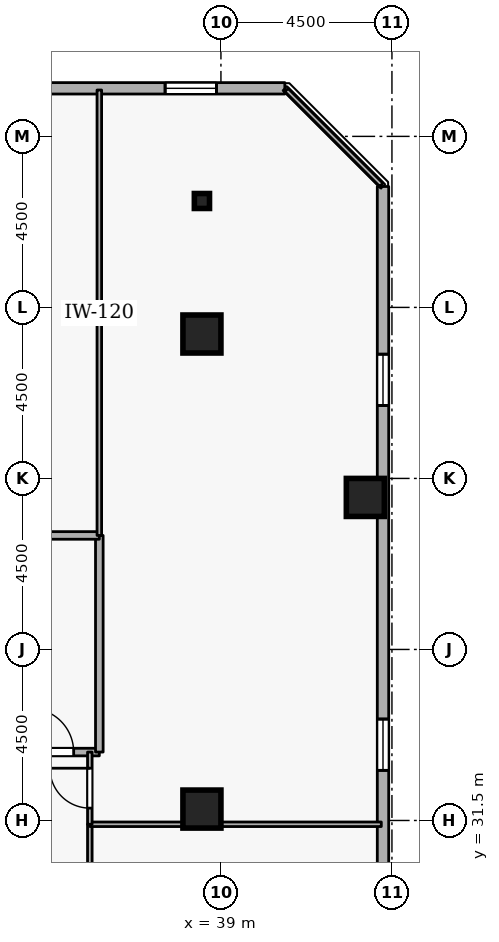
"""IFC4 building model, lengths in metres.
Left out: names, types, materials, properties, quantities, classifications, styles, units other than length and angle.
Written with IfcOpenShell. Run it as: python <this file> out.ifc"""

import sys

from ifc_helpers import new_model, si_unit, direction, frame, frame_2d, origin, origin_2d, place, context, subcontext, project, spatial, rectangle, i_section, extrude, element, fill, save


model = new_model("IFC4")
c1 = context("Model", 3, precision=1e-05, world=origin(), true_north=direction((0.0, 1.0)))
c2 = subcontext(c1, "Body", "Model", "MODEL_VIEW")
j1 = project(units=[si_unit("LENGTHUNIT", "METRE"), si_unit("PLANEANGLEUNIT", "RADIAN")], contexts=[c1])
p1 = place(None, origin())
s1 = spatial("IfcSite", under=j1, at=p1, CompositionType="ELEMENT")
p2 = place(p1, origin())
s2 = spatial("IfcBuilding", under=s1, at=p2, CompositionType="ELEMENT")
p3 = place(p2, frame((0.0, 0.0, 225.9)))
s3 = spatial("IfcBuildingStorey", under=s2, at=p3, CompositionType="ELEMENT", Elevation=225.9)
for number, where, z_axis, x_axis in (
    (1, (42.8, 40.0, 0.0), (0.0, 0.0, 1.0), (1.0, 0.0, 0.0)),
    (2, (38.5, 44.3, 0.0), (0.0, 0.0, 1.0), (1.0, 0.0, 0.0)),
    (3, (38.5, 31.8, 0.0), (0.0, 0.0, 1.0), (1.0, 0.0, 0.0)),
):
    element("IfcColumn", number, at=place(p3, frame(where, z_axis=z_axis, x_axis=x_axis)), inside=s3, PredefinedType="COLUMN", context=c2, shape_type="SweptSolid", body=[
        extrude(rectangle(XDim=1.0, YDim=1.0, at=origin_2d()), origin(), (0.0, 0.0, 1.0), 3.6),
    ])
p4 = place(p3, frame((38.5, 47.8, 0.0), z_axis=(0.0, 0.0, 1.0), x_axis=(1.0, 0.0, 0.0)))
e4 = element("IfcColumn", 4, at=p4, inside=s3, PredefinedType="COLUMN", context=c2, shape_type="SweptSolid", body=[
    extrude(i_section(OverallWidth=0.399, OverallDepth=0.394, WebThickness=0.023, FlangeThickness=0.037, FilletRadius=0.015, at=origin_2d()), origin(), (0.0, 0.0, 1.0), 3.6),
])
p5 = place(p3, frame((43.265, 11.819, 0.0), z_axis=(0.0, 0.0, 1.0), x_axis=(0.0, 1.0, 0.0)))
e5 = element("IfcWall", 5, at=p5, inside=s3, PredefinedType="STANDARD", context=c2, shape_type="SweptSolid", body=[
    extrude(rectangle(XDim=36.363, YDim=0.3, at=frame_2d((18.181, 0.0))), origin(), (0.0, 0.0, 1.0), 2.22),
])
p6 = place(p5, frame((6.6, 0.0, 0.72)))
e6 = element("IfcOpeningElement", 6, at=p6, cuts=e5, PredefinedType="OPENING", context=c2, shape_type="SweptSolid", body=[
    extrude(rectangle(XDim=1.35, YDim=1.05, at=frame_2d((0.675, 0.525))), frame((0.0, 0.16, 0.0), z_axis=(0.0, -1.0, 0.0), x_axis=(1.0, 0.0, 0.0)), (0.0, 0.0, 1.0), 0.32),
])
p7 = place(p5, frame((11.4, 0.0, 0.72)))
e7 = element("IfcOpeningElement", 7, at=p7, cuts=e5, PredefinedType="OPENING", context=c2, shape_type="SweptSolid", body=[
    extrude(rectangle(XDim=1.35, YDim=1.05, at=frame_2d((0.675, 0.525))), frame((0.0, 0.16, 0.0), z_axis=(0.0, -1.0, 0.0), x_axis=(1.0, 0.0, 0.0)), (0.0, 0.0, 1.0), 0.32),
])
p8 = place(p5, frame((21.0, 0.0, 0.72)))
e8 = element("IfcOpeningElement", 8, at=p8, cuts=e5, PredefinedType="OPENING", context=c2, shape_type="SweptSolid", body=[
    extrude(rectangle(XDim=1.35, YDim=1.05, at=frame_2d((0.675, 0.525))), frame((0.0, 0.16, 0.0), z_axis=(0.0, -1.0, 0.0), x_axis=(1.0, 0.0, 0.0)), (0.0, 0.0, 1.0), 0.32),
])
p9 = place(p5, frame((30.6, 0.0, 0.72)))
e9 = element("IfcOpeningElement", 9, at=p9, cuts=e5, PredefinedType="OPENING", context=c2, shape_type="SweptSolid", body=[
    extrude(rectangle(XDim=1.35, YDim=1.05, at=frame_2d((0.675, 0.525))), frame((0.0, 0.16, 0.0), z_axis=(0.0, -1.0, 0.0), x_axis=(1.0, 0.0, 0.0)), (0.0, 0.0, 1.0), 0.32),
])
p10 = place(p3, frame((40.681, 50.765, 0.0), z_axis=(0.0, 0.0, 1.0), x_axis=(-1.0, 0.0, 0.0)))
e10 = element("IfcWall", 10, at=p10, inside=s3, PredefinedType="STANDARD", context=c2, shape_type="SweptSolid", body=[
    extrude(rectangle(XDim=36.363, YDim=0.3, at=frame_2d((18.181, 0.0))), origin(), (0.0, 0.0, 1.0), 2.22),
])
p11 = place(p10, frame((1.8, 0.0, 0.72)))
e11 = element("IfcOpeningElement", 11, at=p11, cuts=e10, PredefinedType="OPENING", context=c2, shape_type="SweptSolid", body=[
    extrude(rectangle(XDim=1.35, YDim=1.05, at=frame_2d((0.675, 0.525))), frame((0.0, 0.16, 0.0), z_axis=(0.0, -1.0, 0.0), x_axis=(1.0, 0.0, 0.0)), (0.0, 0.0, 1.0), 0.32),
])
p12 = place(p10, frame((6.6, 0.0, 0.72)))
e12 = element("IfcOpeningElement", 12, at=p12, cuts=e10, PredefinedType="OPENING", context=c2, shape_type="SweptSolid", body=[
    extrude(rectangle(XDim=1.35, YDim=1.05, at=frame_2d((0.675, 0.525))), frame((0.0, 0.16, 0.0), z_axis=(0.0, -1.0, 0.0), x_axis=(1.0, 0.0, 0.0)), (0.0, 0.0, 1.0), 0.32),
])
p13 = place(p10, frame((11.4, 0.0, 0.72)))
e13 = element("IfcOpeningElement", 13, at=p13, cuts=e10, PredefinedType="OPENING", context=c2, shape_type="SweptSolid", body=[
    extrude(rectangle(XDim=1.35, YDim=1.05, at=frame_2d((0.675, 0.525))), frame((0.0, 0.16, 0.0), z_axis=(0.0, -1.0, 0.0), x_axis=(1.0, 0.0, 0.0)), (0.0, 0.0, 1.0), 0.32),
])
p14 = place(p10, frame((16.2, 0.0, 0.72)))
e14 = element("IfcOpeningElement", 14, at=p14, cuts=e10, PredefinedType="OPENING", context=c2, shape_type="SweptSolid", body=[
    extrude(rectangle(XDim=1.35, YDim=1.05, at=frame_2d((0.675, 0.525))), frame((0.0, 0.16, 0.0), z_axis=(0.0, -1.0, 0.0), x_axis=(1.0, 0.0, 0.0)), (0.0, 0.0, 1.0), 0.32),
])
p15 = place(p10, frame((21.0, 0.0, 0.72)))
e15 = element("IfcOpeningElement", 15, at=p15, cuts=e10, PredefinedType="OPENING", context=c2, shape_type="SweptSolid", body=[
    extrude(rectangle(XDim=1.35, YDim=1.05, at=frame_2d((0.675, 0.525))), frame((0.0, 0.16, 0.0), z_axis=(0.0, -1.0, 0.0), x_axis=(1.0, 0.0, 0.0)), (0.0, 0.0, 1.0), 0.32),
])
p16 = place(p10, frame((30.6, 0.0, 0.72)))
e16 = element("IfcOpeningElement", 16, at=p16, cuts=e10, PredefinedType="OPENING", context=c2, shape_type="SweptSolid", body=[
    extrude(rectangle(XDim=1.35, YDim=1.05, at=frame_2d((0.675, 0.525))), frame((0.0, 0.16, 0.0), z_axis=(0.0, -1.0, 0.0), x_axis=(1.0, 0.0, 0.0)), (0.0, 0.0, 1.0), 0.32),
])
p17 = place(p3, frame((33.3, 33.3, 0.0), z_axis=(0.0, 0.0, 1.0), x_axis=(1.0, 0.0, 0.0)))
e17 = element("IfcWall", 17, at=p17, inside=s3, PredefinedType="STANDARD", context=c2, shape_type="SweptSolid", body=[
    extrude(rectangle(XDim=2.5, YDim=0.2, at=frame_2d((1.25, 0.0))), origin(), (0.0, 0.0, 1.0), 3.3),
])
p18 = place(p17, frame((0.675, 0.0, 0.0)))
e18 = element("IfcOpeningElement", 18, at=p18, cuts=e17, PredefinedType="OPENING", context=c2, shape_type="SweptSolid", body=[
    extrude(rectangle(XDim=1.15, YDim=2.1, at=frame_2d((0.575, 1.05))), frame((0.0, 0.11, 0.0), z_axis=(0.0, -1.0, 0.0), x_axis=(1.0, 0.0, 0.0)), (0.0, 0.0, 1.0), 0.22),
])
p19 = place(p3, frame((35.8, 33.3, 0.0), z_axis=(0.0, 0.0, 1.0), x_axis=(0.0, 1.0, 0.0)))
e19 = element("IfcWall", 19, at=p19, inside=s3, PredefinedType="STANDARD", context=c2, shape_type="SweptSolid", body=[
    extrude(rectangle(XDim=5.7, YDim=0.2, at=frame_2d((2.85, 0.0))), origin(), (0.0, 0.0, 1.0), 3.3),
])
p20 = place(p3, frame((35.8, 39.0, 0.0), z_axis=(0.0, 0.0, 1.0), x_axis=(-1.0, 0.0, 0.0)))
e20 = element("IfcWall", 20, at=p20, inside=s3, PredefinedType="STANDARD", context=c2, shape_type="SweptSolid", body=[
    extrude(rectangle(XDim=2.5, YDim=0.2, at=frame_2d((1.25, 0.0))), origin(), (0.0, 0.0, 1.0), 3.3),
])
p21 = place(p3, frame((35.55, 26.6, 0.0), z_axis=(0.0, 0.0, 1.0), x_axis=(0.0, 1.0, 0.0)))
e21 = element("IfcWall", 21, at=p21, inside=s3, PredefinedType="PARTITIONING", context=c2, shape_type="SweptSolid", body=[
    extrude(rectangle(XDim=4.8, YDim=0.12, at=frame_2d((2.4, 0.0))), origin(), (0.0, 0.0, 1.0), 3.3),
])
p22 = place(p21, frame((1.925, 0.0, 0.0)))
e22 = element("IfcOpeningElement", 22, at=p22, cuts=e21, PredefinedType="OPENING", context=c2, shape_type="SweptSolid", body=[
    extrude(rectangle(XDim=0.95, YDim=2.1, at=frame_2d((0.475, 1.05))), frame((0.0, 0.07, 0.0), z_axis=(0.0, -1.0, 0.0), x_axis=(1.0, 0.0, 0.0)), (0.0, 0.0, 1.0), 0.14),
])
p23 = place(p3, frame((35.55, 31.4, 0.0), z_axis=(0.0, 0.0, 1.0), x_axis=(1.0, 0.0, 0.0)))
e23 = element("IfcWall", 23, at=p23, inside=s3, PredefinedType="PARTITIONING", context=c2, shape_type="SweptSolid", body=[
    extrude(rectangle(XDim=7.67, YDim=0.12, at=frame_2d((3.835, 0.0))), origin(), (0.0, 0.0, 1.0), 3.3),
])
p24 = place(p3, frame((35.8, 39.0, 0.0), z_axis=(0.0, 0.0, 1.0), x_axis=(0.0, 1.0, 0.0)))
e24 = element("IfcWall", 24, at=p24, inside=s3, PredefinedType="PARTITIONING", context=c2, shape_type="SweptSolid", body=[
    extrude(rectangle(XDim=11.72, YDim=0.12, at=frame_2d((5.86, 0.0))), origin(), (0.0, 0.0, 1.0), 3.3),
])
p25 = place(p3, frame((40.725, 50.72, 0.0), z_axis=(0.0, 0.0, 1.0), x_axis=(0.707106781187, -0.707106781187, 0.0)))
e25 = element("IfcWall", 25, at=p25, inside=s3, PredefinedType="PARTITIONING", context=c2, shape_type="SweptSolid", body=[
    extrude(rectangle(XDim=3.528, YDim=0.12, at=frame_2d((1.764, 0.0))), origin(), (0.0, 0.0, 1.0), 3.3),
])
p26 = place(p3, frame((35.55, 31.4, 0.0), z_axis=(0.0, 0.0, 1.0), x_axis=(0.0, 1.0, 0.0)))
e26 = element("IfcWall", 26, at=p26, inside=s3, PredefinedType="PARTITIONING", context=c2, shape_type="SweptSolid", body=[
    extrude(rectangle(XDim=1.9, YDim=0.12, at=frame_2d((0.95, 0.0))), origin(), (0.0, 0.0, 1.0), 3.3),
])
p27 = place(p26, frame((0.425, 0.0, 0.0)))
e27 = element("IfcOpeningElement", 27, at=p27, cuts=e26, PredefinedType="OPENING", context=c2, shape_type="SweptSolid", body=[
    extrude(rectangle(XDim=1.05, YDim=2.1, at=frame_2d((0.525, 1.05))), frame((0.0, 0.07, 0.0), z_axis=(0.0, -1.0, 0.0), x_axis=(1.0, 0.0, 0.0)), (0.0, 0.0, 1.0), 0.14),
])
p28 = place(p8, origin())
e28 = element("IfcWindow", 28, at=p28, inside=s3, PartitioningType="SINGLE_PANEL", PredefinedType="WINDOW", context=c2, shape_type="SweptSolid", body=[
    extrude(rectangle(XDim=1.35, YDim=1.05, at=frame_2d((0.675, 0.525))), frame((0.0, 0.03, 0.0), z_axis=(0.0, -1.0, 0.0), x_axis=(1.0, 0.0, 0.0)), (0.0, 0.0, 1.0), 0.06),
])
fill(e8, e28)
p29 = place(p9, origin())
e29 = element("IfcWindow", 29, at=p29, inside=s3, PartitioningType="SINGLE_PANEL", PredefinedType="WINDOW", context=c2, shape_type="SweptSolid", body=[
    extrude(rectangle(XDim=1.35, YDim=1.05, at=frame_2d((0.675, 0.525))), frame((0.0, 0.03, 0.0), z_axis=(0.0, -1.0, 0.0), x_axis=(1.0, 0.0, 0.0)), (0.0, 0.0, 1.0), 0.06),
])
fill(e9, e29)
p30 = place(p11, origin())
e30 = element("IfcWindow", 30, at=p30, inside=s3, PartitioningType="SINGLE_PANEL", PredefinedType="WINDOW", context=c2, shape_type="SweptSolid", body=[
    extrude(rectangle(XDim=1.35, YDim=1.05, at=frame_2d((0.675, 0.525))), frame((0.0, 0.03, 0.0), z_axis=(0.0, -1.0, 0.0), x_axis=(1.0, 0.0, 0.0)), (0.0, 0.0, 1.0), 0.06),
])
fill(e11, e30)
p31 = place(p18, origin())
e31 = element("IfcDoor", 31, at=p31, inside=s3, OperationType="SINGLE_SWING_LEFT", PredefinedType="DOOR", context=c2, shape_type="SweptSolid", body=[
    extrude(rectangle(XDim=1.15, YDim=2.1, at=frame_2d((0.575, 1.05))), frame((0.0, 0.025, 0.0), z_axis=(0.0, -1.0, 0.0), x_axis=(1.0, 0.0, 0.0)), (0.0, 0.0, 1.0), 0.05),
])
fill(e18, e31)
p32 = place(p27, origin())
e32 = element("IfcDoor", 32, at=p32, inside=s3, OperationType="SINGLE_SWING_RIGHT", PredefinedType="DOOR", context=c2, shape_type="SweptSolid", body=[
    extrude(rectangle(XDim=1.05, YDim=2.1, at=frame_2d((0.525, 1.05))), frame((0.0, 0.025, 0.0), z_axis=(0.0, -1.0, 0.0), x_axis=(1.0, 0.0, 0.0)), (0.0, 0.0, 1.0), 0.05),
])
fill(e27, e32)
save(model, sys.argv[1])
